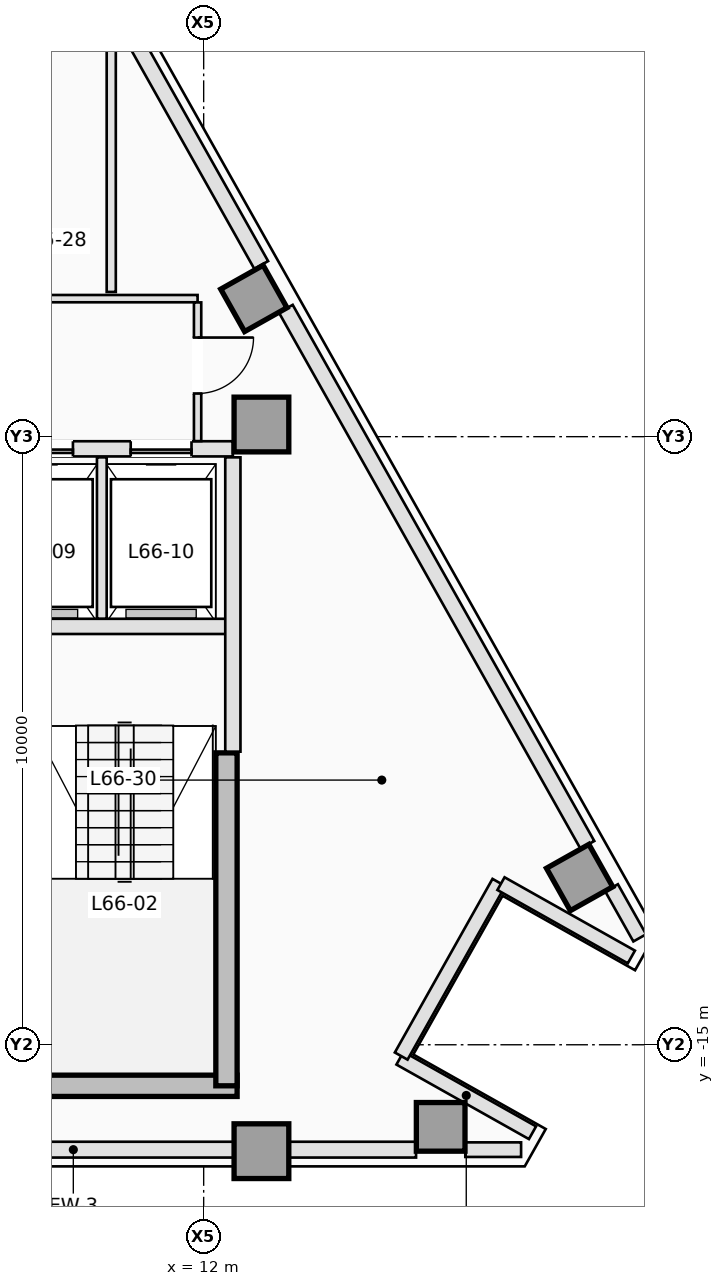
"""IFC4 building model, lengths in metres.
Left out: names, types, materials, properties, quantities, classifications, styles, units other than length and angle.
Written with IfcOpenShell. Run it as: python <this file> out.ifc"""

import sys

from ifc_helpers import new_model, si_unit, direction, frame, frame_2d, origin, origin_2d, place, context, subcontext, project, spatial, rectangle, extrude, element, fill, save


model = new_model("IFC4")
c1 = context("Model", 3, precision=1e-05, world=origin(), true_north=direction((0.0, 1.0)))
c2 = subcontext(c1, "Body", "Model", "MODEL_VIEW")
j1 = project(units=[si_unit("LENGTHUNIT", "METRE"), si_unit("PLANEANGLEUNIT", "RADIAN")], contexts=[c1])
p1 = place(None, origin())
s1 = spatial("IfcSite", under=j1, at=p1, CompositionType="ELEMENT")
p2 = place(p1, origin())
s2 = spatial("IfcBuilding", under=s1, at=p2, CompositionType="ELEMENT")
p3 = place(p2, frame((0.0, 0.0, 239.4)))
s3 = spatial("IfcBuildingStorey", under=s2, at=p3, CompositionType="ELEMENT", Elevation=239.4)
p4 = place(p3, frame((8.85, -15.675, 0.0), z_axis=(0.0, 0.0, 1.0), x_axis=(1.0, 0.0, 0.0)))
e1 = element("IfcWall", 1, at=p4, inside=s3, PredefinedType="SHEAR", context=c2, shape_type="SweptSolid", body=[
    extrude(rectangle(XDim=3.7, YDim=0.35, at=frame_2d((1.85, 0.0))), origin(), (0.0, 0.0, 1.0), 3.5),
])
p5 = place(p3, frame((12.375, -15.675, 0.0), z_axis=(0.0, 0.0, 1.0), x_axis=(0.0, 1.0, 0.0)))
e2 = element("IfcWall", 2, at=p5, inside=s3, PredefinedType="SHEAR", context=c2, shape_type="SweptSolid", body=[
    extrude(rectangle(XDim=5.475, YDim=0.35, at=frame_2d((2.738, 0.0))), origin(), (0.0, 0.0, 1.0), 3.5),
])
for number, where, z_axis, x_axis in (
    (3, (12.95, -16.75, 0.0), (0.0, 0.0, 1.0), (1.0, 0.0, 0.0)),
    (4, (12.95, -4.8, 0.0), (0.0, 0.0, 1.0), (1.0, 0.0, 0.0)),
):
    element("IfcColumn", number, at=place(p3, frame(where, z_axis=z_axis, x_axis=x_axis)), inside=s3, PredefinedType="COLUMN", context=c2, shape_type="SweptSolid", body=[
        extrude(rectangle(XDim=0.9, YDim=0.9, at=origin_2d()), origin(), (0.0, 0.0, 1.0), 3.5),
    ])
for number, where, z_axis, x_axis in (
    (5, (15.898, -16.35, 0.0), (0.0, 0.0, 1.0), (0.0, 1.0, 0.0)),
    (6, (18.182, -12.25, 0.0), (0.0, 0.0, 1.0), (0.872, 0.49, 0.0)),
    (7, (12.825, -2.727, 0.0), (0.0, 0.0, 1.0), (0.872, 0.49, 0.0)),
):
    element("IfcColumn", number, at=place(p3, frame(where, z_axis=z_axis, x_axis=x_axis)), inside=s3, PredefinedType="COLUMN", context=c2, shape_type="SweptSolid", body=[
        extrude(rectangle(XDim=0.8, YDim=0.8, at=origin_2d()), origin(), (0.0, 0.0, 1.0), 3.5),
    ])
p6 = place(p3, frame((17.22, -16.725, 0.0), z_axis=(0.0, 0.0, 1.0), x_axis=(-1.0, 0.0, 0.0)))
e8 = element("IfcWall", 8, at=p6, inside=s3, PredefinedType="STANDARD", context=c2, shape_type="SweptSolid", body=[
    extrude(rectangle(XDim=0.917, YDim=0.24, at=frame_2d((0.459, 0.0))), origin(), (0.0, 0.0, 1.0), 3.25),
])
p7 = place(p3, frame((15.493, -16.725, 0.0), z_axis=(0.0, 0.0, 1.0), x_axis=(-1.0, 0.0, 0.0)))
e9 = element("IfcWall", 9, at=p7, inside=s3, PredefinedType="STANDARD", context=c2, shape_type="SweptSolid", body=[
    extrude(rectangle(XDim=11.273, YDim=0.26, at=frame_2d((5.636, 0.0))), origin(), (0.0, 0.0, 1.0), 2.79),
])
p8 = place(p3, frame((18.708, -12.419, 0.0), z_axis=(0.0, 0.0, 1.0), x_axis=(0.490199895283, -0.871610040479, 0.0)))
e10 = element("IfcWall", 10, at=p8, inside=s3, PredefinedType="STANDARD", context=c2, shape_type="SweptSolid", body=[
    extrude(rectangle(XDim=0.945, YDim=0.24, at=frame_2d((0.472, 0.0))), origin(), (0.0, 0.0, 1.0), 3.25),
])
p9 = place(p3, frame((13.351, -2.896, 0.0), z_axis=(0.0, 0.0, 1.0), x_axis=(0.490266968583, -0.871572314565, 0.0)))
e11 = element("IfcWall", 11, at=p9, inside=s3, PredefinedType="STANDARD", context=c2, shape_type="SweptSolid", body=[
    extrude(rectangle(XDim=10.116, YDim=0.26, at=frame_2d((5.058, 0.0))), origin(), (0.0, 0.0, 1.0), 3.25),
])
p10 = place(p3, frame((10.869, 1.516, 0.0), z_axis=(0.0, 0.0, 1.0), x_axis=(0.490244825075, -0.871584770109, 0.0)))
e12 = element("IfcWall", 12, at=p10, inside=s3, PredefinedType="STANDARD", context=c2, shape_type="SweptSolid", body=[
    extrude(rectangle(XDim=4.237, YDim=0.26, at=frame_2d((2.119, 0.0))), origin(), (0.0, 0.0, 1.0), 3.25),
])
p11 = place(p3, frame((17.408, -16.447, 0.0), z_axis=(0.0, 0.0, 1.0), x_axis=(-0.871588577066, 0.490238056792, 0.0)))
e13 = element("IfcWall", 13, at=p11, inside=s3, PredefinedType="STANDARD", context=c2, shape_type="SweptSolid", body=[
    extrude(rectangle(XDim=2.5, YDim=0.24, at=frame_2d((1.25, 0.0))), origin(), (0.0, 0.0, 1.0), 3.25),
])
p12 = place(p3, frame((15.248, -15.186, 0.0), z_axis=(0.0, 0.0, 1.0), x_axis=(0.490293083368, 0.871557624258, 0.0)))
e14 = element("IfcWall", 14, at=p12, inside=s3, PredefinedType="STANDARD", context=c2, shape_type="SweptSolid", body=[
    extrude(rectangle(XDim=3.276, YDim=0.24, at=frame_2d((1.638, 0.0))), origin(), (0.0, 0.0, 1.0), 2.79),
])
p13 = place(p3, frame((16.889, -12.35, 0.0), z_axis=(0.0, 0.0, 1.0), x_axis=(0.87157023615, -0.490270663468, 0.0)))
e15 = element("IfcWall", 15, at=p13, inside=s3, PredefinedType="STANDARD", context=c2, shape_type="SweptSolid", body=[
    extrude(rectangle(XDim=2.46, YDim=0.24, at=frame_2d((1.23, 0.0))), origin(), (0.0, 0.0, 1.0), 3.25),
])
p14 = place(p3, frame((9.16, -8.12, 0.0), z_axis=(0.0, 0.0, 1.0), x_axis=(1.0, 0.0, 0.0)))
e16 = element("IfcWall", 16, at=p14, inside=s3, PredefinedType="PARTITIONING", context=c2, shape_type="SweptSolid", body=[
    extrude(rectangle(XDim=3.22, YDim=0.25, at=frame_2d((1.61, 0.0))), origin(), (0.0, 0.0, 1.0), 3.25),
])
p15 = place(p3, frame((12.48, -10.18, 0.0), z_axis=(0.0, 0.0, 1.0), x_axis=(0.0, 1.0, 0.0)))
e17 = element("IfcWall", 17, at=p15, inside=s3, PredefinedType="PARTITIONING", context=c2, shape_type="SweptSolid", body=[
    extrude(rectangle(XDim=4.84, YDim=0.25, at=frame_2d((2.42, 0.0))), origin(), (0.0, 0.0, 1.0), 3.25),
])
p16 = place(p3, frame((4.202, -5.2, 0.0), z_axis=(0.0, 0.0, 1.0), x_axis=(1.0, 0.0, 0.0)))
e18 = element("IfcWall", 18, at=p16, inside=s3, PredefinedType="PARTITIONING", context=c2, shape_type="SweptSolid", body=[
    extrude(rectangle(XDim=8.278, YDim=0.25, at=frame_2d((4.139, 0.0))), origin(), (0.0, 0.0, 1.0), 3.25),
])
p17 = place(p16, frame((0.748, 0.0, 0.0)))
e19 = element("IfcOpeningElement", 19, at=p17, cuts=e18, PredefinedType="OPENING", context=c2, shape_type="SweptSolid", body=[
    extrude(rectangle(XDim=1.0, YDim=2.15, at=frame_2d((0.5, 1.075))), frame((0.0, 0.135, 0.0), z_axis=(0.0, -1.0, 0.0), x_axis=(1.0, 0.0, 0.0)), (0.0, 0.0, 1.0), 0.27),
])
p18 = place(p16, frame((2.698, 0.0, 0.0)))
e20 = element("IfcOpeningElement", 20, at=p18, cuts=e18, PredefinedType="OPENING", context=c2, shape_type="SweptSolid", body=[
    extrude(rectangle(XDim=1.0, YDim=2.15, at=frame_2d((0.5, 1.075))), frame((0.0, 0.135, 0.0), z_axis=(0.0, -1.0, 0.0), x_axis=(1.0, 0.0, 0.0)), (0.0, 0.0, 1.0), 0.27),
])
p19 = place(p16, frame((4.648, 0.0, 0.0)))
e21 = element("IfcOpeningElement", 21, at=p19, cuts=e18, PredefinedType="OPENING", context=c2, shape_type="SweptSolid", body=[
    extrude(rectangle(XDim=1.0, YDim=2.15, at=frame_2d((0.5, 1.075))), frame((0.0, 0.135, 0.0), z_axis=(0.0, -1.0, 0.0), x_axis=(1.0, 0.0, 0.0)), (0.0, 0.0, 1.0), 0.27),
])
p20 = place(p16, frame((6.598, 0.0, 0.0)))
e22 = element("IfcOpeningElement", 22, at=p20, cuts=e18, PredefinedType="OPENING", context=c2, shape_type="SweptSolid", body=[
    extrude(rectangle(XDim=1.0, YDim=2.15, at=frame_2d((0.5, 1.075))), frame((0.0, 0.135, 0.0), z_axis=(0.0, -1.0, 0.0), x_axis=(1.0, 0.0, 0.0)), (0.0, 0.0, 1.0), 0.27),
])
p21 = place(p3, frame((10.325, -7.993, 0.0), z_axis=(0.0, 0.0, 1.0), x_axis=(0.0, 1.0, 0.0)))
e23 = element("IfcWall", 23, at=p21, inside=s3, PredefinedType="PARTITIONING", context=c2, shape_type="SweptSolid", body=[
    extrude(rectangle(XDim=2.653, YDim=0.16, at=frame_2d((1.326, 0.0))), origin(), (0.0, 0.0, 1.0), 3.25),
])
p22 = place(p3, frame((8.612, -2.73, 0.0), z_axis=(0.0, 0.0, 1.0), x_axis=(1.0, 0.0, 0.0)))
e24 = element("IfcWall", 24, at=p22, inside=s3, PredefinedType="PARTITIONING", context=c2, shape_type="SweptSolid", body=[
    extrude(rectangle(XDim=3.288, YDim=0.12, at=frame_2d((1.644, 0.0))), origin(), (0.0, 0.0, 1.0), 3.25),
])
p23 = place(p3, frame((11.9, -2.792, 0.0), z_axis=(0.0, 0.0, 1.0), x_axis=(0.0, -1.0, 0.0)))
e25 = element("IfcWall", 25, at=p23, inside=s3, PredefinedType="PARTITIONING", context=c2, shape_type="SweptSolid", body=[
    extrude(rectangle(XDim=2.281, YDim=0.12, at=frame_2d((1.141, 0.0))), origin(), (0.0, 0.0, 1.0), 3.25),
])
p24 = place(p23, frame((0.578, 0.0, 0.0)))
e26 = element("IfcOpeningElement", 26, at=p24, cuts=e25, PredefinedType="OPENING", context=c2, shape_type="SweptSolid", body=[
    extrude(rectangle(XDim=0.92, YDim=2.12, at=frame_2d((0.46, 1.06))), frame((0.0, 0.07, 0.0), z_axis=(0.0, -1.0, 0.0), x_axis=(1.0, 0.0, 0.0)), (0.0, 0.0, 1.0), 0.14),
])
p25 = place(p3, frame((10.48, 2.103, 0.0), z_axis=(0.0, 0.0, 1.0), x_axis=(0.0, -1.0, 0.0)))
e27 = element("IfcWall", 27, at=p25, inside=s3, PredefinedType="PARTITIONING", context=c2, shape_type="SweptSolid", body=[
    extrude(rectangle(XDim=4.723, YDim=0.15, at=frame_2d((2.362, 0.0))), origin(), (0.0, 0.0, 1.0), 3.25),
])
p26 = place(p19, origin())
e28 = element("IfcDoor", 28, at=p26, inside=s3, OperationType="SLIDING_TO_RIGHT", PredefinedType="DOOR", context=c2, shape_type="SweptSolid", body=[
    extrude(rectangle(XDim=1.0, YDim=2.15, at=frame_2d((0.5, 1.075))), frame((0.0, 0.025, 0.0), z_axis=(0.0, -1.0, 0.0), x_axis=(1.0, 0.0, 0.0)), (0.0, 0.0, 1.0), 0.05),
])
fill(e21, e28)
p27 = place(p20, origin())
e29 = element("IfcDoor", 29, at=p27, inside=s3, OperationType="SLIDING_TO_RIGHT", PredefinedType="DOOR", context=c2, shape_type="SweptSolid", body=[
    extrude(rectangle(XDim=1.0, YDim=2.15, at=frame_2d((0.5, 1.075))), frame((0.0, 0.025, 0.0), z_axis=(0.0, -1.0, 0.0), x_axis=(1.0, 0.0, 0.0)), (0.0, 0.0, 1.0), 0.05),
])
fill(e22, e29)
p28 = place(p24, origin())
e30 = element("IfcDoor", 30, at=p28, inside=s3, OperationType="SINGLE_SWING_LEFT", PredefinedType="DOOR", context=c2, shape_type="SweptSolid", body=[
    extrude(rectangle(XDim=0.92, YDim=2.12, at=frame_2d((0.46, 1.06))), frame((0.0, 0.025, 0.0), z_axis=(0.0, -1.0, 0.0), x_axis=(1.0, 0.0, 0.0)), (0.0, 0.0, 1.0), 0.05),
])
fill(e26, e30)
save(model, sys.argv[1])
